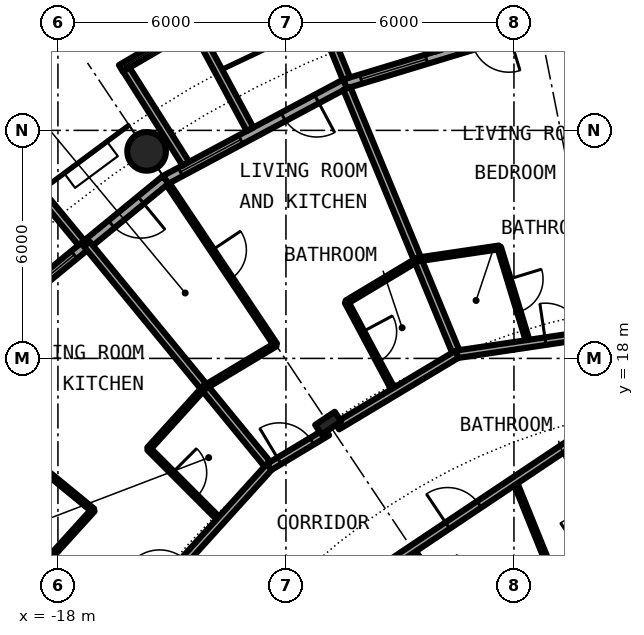
"""IFC4 building model, lengths in metres.
Left out: names, types, materials, properties, quantities, classifications, styles, units other than length and angle.
Written with IfcOpenShell. Run it as: python <this file> out.ifc"""

import sys

from ifc_helpers import new_model, si_unit, direction, frame, frame_2d, origin, origin_2d, place, context, subcontext, project, spatial, rectangle, circle, hollow_circle, i_section, extrude, element, fill, save


model = new_model("IFC4")
c1 = context("Model", 3, precision=1e-05, world=origin(), true_north=direction((0.0, 1.0)))
c2 = subcontext(c1, "Body", "Model", "MODEL_VIEW")
j1 = project(units=[si_unit("LENGTHUNIT", "METRE"), si_unit("PLANEANGLEUNIT", "RADIAN")], contexts=[c1])
p1 = place(None, origin())
s1 = spatial("IfcSite", under=j1, at=p1, CompositionType="ELEMENT")
p2 = place(p1, origin())
s2 = spatial("IfcBuilding", under=s1, at=p2, CompositionType="ELEMENT")
p3 = place(p2, frame((0.0, 0.0, 31.95)))
s3 = spatial("IfcBuildingStorey", under=s2, at=p3, CompositionType="ELEMENT", Elevation=31.95)
p4 = place(p3, frame((-15.667, 23.448, 0.0), z_axis=(0.0, 0.0, 1.0), x_axis=(1.0, 0.0, 0.0)))
e1 = element("IfcColumn", 1, at=p4, inside=s3, PredefinedType="COLUMN", context=c2, shape_type="SweptSolid", body=[
    extrude(hollow_circle(Radius=0.508, WallThickness=0.05, at=origin_2d()), origin(), (0.0, 0.0, 1.0), 3.05),
])
p5 = place(p3, frame((-10.889, 16.297, 0.0), z_axis=(0.0, 0.0, 1.0), x_axis=(-0.55557023302, 0.831469612303, 0.0)))
e2 = element("IfcColumn", 2, at=p5, inside=s3, PredefinedType="COLUMN", context=c2, shape_type="SweptSolid", body=[
    extrude(i_section(OverallWidth=0.305, OverallDepth=0.62, WebThickness=0.021, FlangeThickness=0.04, FilletRadius=0.027, at=origin_2d()), origin(), (0.0, 0.0, 1.0), 3.05),
])
p6 = place(p3, frame((-5.326, 26.775, 0.0), z_axis=(0.0, 0.0, 1.0), x_axis=(-0.956965678721, -0.290201119486, 0.0)))
e3 = element("IfcWall", 3, at=p6, inside=s3, PredefinedType="SOLIDWALL", context=c2, shape_type="SweptSolid", body=[
    extrude(rectangle(XDim=5.351, YDim=0.25, at=frame_2d((2.676, 0.0))), origin(), (0.0, 0.0, 1.0), 2.7),
])
p7 = place(p6, frame((0.841, 0.0, 0.0)))
e4 = element("IfcOpeningElement", 4, at=p7, cuts=e3, PredefinedType="OPENING", context=c2, shape_type="SweptSolid", body=[
    extrude(rectangle(XDim=1.0, YDim=2.2, at=frame_2d((0.5, 1.1))), frame((0.0, 0.135, 0.0), z_axis=(0.0, -1.0, 0.0), x_axis=(1.0, 0.0, 0.0)), (0.0, 0.0, 1.0), 0.27),
])
p8 = place(p6, frame((3.111, 0.0, 0.3)))
e5 = element("IfcOpeningElement", 5, at=p8, cuts=e3, PredefinedType="OPENING", context=c2, shape_type="SweptSolid", body=[
    extrude(rectangle(XDim=1.8, YDim=2.1, at=frame_2d((0.9, 1.05))), frame((0.0, 0.135, 0.0), z_axis=(0.0, -1.0, 0.0), x_axis=(1.0, 0.0, 0.0)), (0.0, 0.0, 1.0), 0.27),
])
p9 = place(p3, frame((-8.009, 26.092, -0.03), z_axis=(0.0, 0.0, 1.0), x_axis=(-0.293406695073, 0.955987715029, 0.0)))
e6 = element("IfcWall", 6, at=p9, inside=s3, PredefinedType="SOLIDWALL", context=c2, shape_type="SweptSolid", body=[
    extrude(rectangle(XDim=3.006, YDim=0.2, at=frame_2d((1.503, 0.0))), origin(), (0.0, 0.0, 1.0), 2.73),
])
p10 = place(p3, frame((-10.409, 25.364, -0.03), z_axis=(0.0, 0.0, 1.0), x_axis=(-0.379509886562, 0.925187681501, 0.0)))
e7 = element("IfcWall", 7, at=p10, inside=s3, PredefinedType="SOLIDWALL", context=c2, shape_type="SweptSolid", body=[
    extrude(rectangle(XDim=2.883, YDim=0.2, at=frame_2d((1.441, 0.0))), origin(), (0.0, 0.0, 1.0), 2.73),
])
p11 = place(p3, frame((-10.447, 25.222, 0.0), z_axis=(0.0, 0.0, 1.0), x_axis=(-0.881915646801, -0.471407246368, 0.0)))
e8 = element("IfcWall", 8, at=p11, inside=s3, PredefinedType="SOLIDWALL", context=c2, shape_type="SweptSolid", body=[
    extrude(rectangle(XDim=5.352, YDim=0.25, at=frame_2d((2.676, 0.0))), origin(), (0.0, 0.0, 1.0), 2.7),
])
p12 = place(p11, frame((0.841, 0.0, 0.0)))
e9 = element("IfcOpeningElement", 9, at=p12, cuts=e8, PredefinedType="OPENING", context=c2, shape_type="SweptSolid", body=[
    extrude(rectangle(XDim=1.0, YDim=2.2, at=frame_2d((0.5, 1.1))), frame((0.0, 0.135, 0.0), z_axis=(0.0, -1.0, 0.0), x_axis=(1.0, 0.0, 0.0)), (0.0, 0.0, 1.0), 0.27),
])
p13 = place(p11, frame((3.111, 0.0, 0.3)))
e10 = element("IfcOpeningElement", 10, at=p13, cuts=e8, PredefinedType="OPENING", context=c2, shape_type="SweptSolid", body=[
    extrude(rectangle(XDim=1.8, YDim=2.1, at=frame_2d((0.9, 1.05))), frame((0.0, 0.135, 0.0), z_axis=(0.0, -1.0, 0.0), x_axis=(1.0, 0.0, 0.0)), (0.0, 0.0, 1.0), 0.27),
])
p14 = place(p3, frame((-14.327, 26.812, -0.03), z_axis=(0.0, 0.0, 1.0), x_axis=(-0.863346521872, -0.504611517081, 0.0)))
e11 = element("IfcWall", 11, at=p14, inside=s3, PredefinedType="SOLIDWALL", context=c2, shape_type="SweptSolid", body=[
    extrude(rectangle(XDim=2.336, YDim=0.2, at=frame_2d((1.168, 0.0))), origin(), (0.0, 0.0, 1.0), 2.73),
])
p15 = place(p14, frame((0.128, 0.0, 0.33)))
e12 = element("IfcOpeningElement", 12, at=p15, cuts=e11, PredefinedType="OPENING", context=c2, shape_type="SweptSolid", body=[
    extrude(circle(Radius=1.04, at=frame_2d((1.04, 1.04))), frame((0.0, 0.11, 0.0), z_axis=(0.0, -1.0, 0.0), x_axis=(1.0, 0.0, 0.0)), (0.0, 0.0, 1.0), 0.22),
])
p16 = place(p3, frame((-12.945, 24.029, -0.03), z_axis=(0.0, 0.0, 1.0), x_axis=(-0.474424310775, 0.88029629861, 0.0)))
e13 = element("IfcWall", 13, at=p16, inside=s3, PredefinedType="SOLIDWALL", context=c2, shape_type="SweptSolid", body=[
    extrude(rectangle(XDim=3.006, YDim=0.2, at=frame_2d((1.503, 0.0))), origin(), (0.0, 0.0, 1.0), 2.73),
])
p17 = place(p3, frame((-14.635, 23.126, -0.03), z_axis=(0.0, 0.0, 1.0), x_axis=(-0.534437802731, 0.845207805816, 0.0)))
e14 = element("IfcWall", 14, at=p17, inside=s3, PredefinedType="SOLIDWALL", context=c2, shape_type="SweptSolid", body=[
    extrude(rectangle(XDim=2.932, YDim=0.2, at=frame_2d((1.466, 0.0))), origin(), (0.0, 0.0, 1.0), 2.73),
])
p18 = place(p3, frame((-15.167, 22.699, 0.0), z_axis=(0.0, 0.0, 1.0), x_axis=(-0.773019449054, -0.634382322723, 0.0)))
e15 = element("IfcWall", 15, at=p18, inside=s3, PredefinedType="SOLIDWALL", context=c2, shape_type="SweptSolid", body=[
    extrude(rectangle(XDim=5.352, YDim=0.25, at=frame_2d((2.676, 0.0))), origin(), (0.0, 0.0, 1.0), 2.7),
])
p19 = place(p18, frame((0.841, 0.0, 0.0)))
e16 = element("IfcOpeningElement", 16, at=p19, cuts=e15, PredefinedType="OPENING", context=c2, shape_type="SweptSolid", body=[
    extrude(rectangle(XDim=1.0, YDim=2.2, at=frame_2d((0.5, 1.1))), frame((0.0, 0.135, 0.0), z_axis=(0.0, -1.0, 0.0), x_axis=(1.0, 0.0, 0.0)), (0.0, 0.0, 1.0), 0.27),
])
p20 = place(p18, frame((3.111, 0.0, 0.3)))
e17 = element("IfcOpeningElement", 17, at=p20, cuts=e15, PredefinedType="OPENING", context=c2, shape_type="SweptSolid", body=[
    extrude(rectangle(XDim=1.8, YDim=2.1, at=frame_2d((0.9, 1.05))), frame((0.0, 0.135, 0.0), z_axis=(0.0, -1.0, 0.0), x_axis=(1.0, 0.0, 0.0)), (0.0, 0.0, 1.0), 0.27),
])
p21 = place(p3, frame((-17.384, 21.041, -0.03), z_axis=(0.0, 0.0, 1.0), x_axis=(-0.63709551667, 0.770784861449, 0.0)))
e18 = element("IfcWall", 18, at=p21, inside=s3, PredefinedType="SOLIDWALL", context=c2, shape_type="SweptSolid", body=[
    extrude(rectangle(XDim=3.006, YDim=0.2, at=frame_2d((1.503, 0.0))), origin(), (0.0, 0.0, 1.0), 2.73),
])
p22 = place(p3, frame((-22.595, 15.097, 0.0), z_axis=(0.0, 0.0, 1.0), x_axis=(0.831465568067, -0.555576285599, 0.0)))
e19 = element("IfcWall", 19, at=p22, inside=s3, PredefinedType="PARTITIONING", context=c2, shape_type="SweptSolid", body=[
    extrude(rectangle(XDim=7.264, YDim=0.2, at=frame_2d((3.632, 0.0))), origin(), (0.0, 0.0, 1.0), 2.7),
])
p23 = place(p3, frame((-21.012, 17.233, 0.0), z_axis=(0.0, 0.0, 1.0), x_axis=(0.77326214499, -0.634086472908, 0.0)))
e20 = element("IfcWall", 20, at=p23, inside=s3, PredefinedType="PARTITIONING", context=c2, shape_type="SweptSolid", body=[
    extrude(rectangle(XDim=5.089, YDim=0.1, at=frame_2d((2.544, 0.0))), origin(), (0.0, 0.0, 1.0), 2.7),
])
p24 = place(p23, frame((2.094, 0.0, 0.0)))
e21 = element("IfcOpeningElement", 21, at=p24, cuts=e20, PredefinedType="OPENING", context=c2, shape_type="SweptSolid", body=[
    extrude(rectangle(XDim=0.9, YDim=2.3, at=frame_2d((0.45, 1.15))), frame((0.0, 0.06, 0.0), z_axis=(0.0, -1.0, 0.0), x_axis=(1.0, 0.0, 0.0)), (0.0, 0.0, 1.0), 0.12),
])
p25 = place(p3, frame((-17.24, 21.007, 0.0), z_axis=(0.0, 0.0, 1.0), x_axis=(0.634381303318, -0.773020285633, 0.0)))
e22 = element("IfcWall", 22, at=p25, inside=s3, PredefinedType="PARTITIONING", context=c2, shape_type="SweptSolid", body=[
    extrude(rectangle(XDim=7.576, YDim=0.2, at=frame_2d((3.788, 0.0))), origin(), (0.0, 0.0, 1.0), 2.7),
])
p26 = place(p3, frame((-15.612, 15.622, 0.0), z_axis=(0.0, 0.0, 1.0), x_axis=(0.706741540154, -0.707471833659, 0.0)))
e23 = element("IfcWall", 23, at=p26, inside=s3, PredefinedType="PARTITIONING", context=c2, shape_type="SweptSolid", body=[
    extrude(rectangle(XDim=2.674, YDim=0.1, at=frame_2d((1.337, 0.0))), origin(), (0.0, 0.0, 1.0), 2.7),
])
p27 = place(p26, frame((0.887, 0.0, 0.0)))
e24 = element("IfcOpeningElement", 24, at=p27, cuts=e23, PredefinedType="OPENING", context=c2, shape_type="SweptSolid", body=[
    extrude(rectangle(XDim=0.9, YDim=2.3, at=frame_2d((0.45, 1.15))), frame((0.0, 0.06, 0.0), z_axis=(0.0, -1.0, 0.0), x_axis=(1.0, 0.0, 0.0)), (0.0, 0.0, 1.0), 0.12),
])
p28 = place(p3, frame((-15.105, 22.59, 0.0), z_axis=(0.0, 0.0, 1.0), x_axis=(0.555939561221, -0.831222716406, 0.0)))
e25 = element("IfcWall", 25, at=p28, inside=s3, PredefinedType="PARTITIONING", context=c2, shape_type="SweptSolid", body=[
    extrude(rectangle(XDim=5.089, YDim=0.1, at=frame_2d((2.544, 0.0))), origin(), (0.0, 0.0, 1.0), 2.7),
])
p29 = place(p28, frame((2.094, 0.0, 0.0)))
e26 = element("IfcOpeningElement", 26, at=p29, cuts=e25, PredefinedType="OPENING", context=c2, shape_type="SweptSolid", body=[
    extrude(rectangle(XDim=0.9, YDim=2.3, at=frame_2d((0.45, 1.15))), frame((0.0, 0.06, 0.0), z_axis=(0.0, -1.0, 0.0), x_axis=(1.0, 0.0, 0.0)), (0.0, 0.0, 1.0), 0.12),
])
p30 = place(p3, frame((-10.405, 19.481, 0.0), z_axis=(0.0, 0.0, 1.0), x_axis=(0.471151994359, -0.882052038267, 0.0)))
e27 = element("IfcWall", 27, at=p30, inside=s3, PredefinedType="PARTITIONING", context=c2, shape_type="SweptSolid", body=[
    extrude(rectangle(XDim=2.674, YDim=0.1, at=frame_2d((1.337, 0.0))), origin(), (0.0, 0.0, 1.0), 2.7),
])
p31 = place(p30, frame((0.887, 0.0, 0.0)))
e28 = element("IfcOpeningElement", 28, at=p31, cuts=e27, PredefinedType="OPENING", context=c2, shape_type="SweptSolid", body=[
    extrude(rectangle(XDim=0.9, YDim=2.3, at=frame_2d((0.45, 1.15))), frame((0.0, 0.06, 0.0), z_axis=(0.0, -1.0, 0.0), x_axis=(1.0, 0.0, 0.0)), (0.0, 0.0, 1.0), 0.12),
])
p32 = place(p3, frame((-10.398, 25.106, 0.0), z_axis=(0.0, 0.0, 1.0), x_axis=(0.382490346157, -0.923959487801, 0.0)))
e29 = element("IfcWall", 29, at=p32, inside=s3, PredefinedType="PARTITIONING", context=c2, shape_type="SweptSolid", body=[
    extrude(rectangle(XDim=7.574, YDim=0.2, at=frame_2d((3.787, 0.0))), origin(), (0.0, 0.0, 1.0), 2.7),
])
p33 = place(p3, frame((-8.674, 12.982, 0.0), z_axis=(0.0, 0.0, 1.0), x_axis=(0.555355163998, -0.831613276602, 0.0)))
e30 = element("IfcWall", 30, at=p33, inside=s3, PredefinedType="PARTITIONING", context=c2, shape_type="SweptSolid", body=[
    extrude(rectangle(XDim=2.494, YDim=0.1, at=frame_2d((1.247, 0.0))), origin(), (0.0, 0.0, 1.0), 2.7),
])
p34 = place(p33, frame((0.797, 0.0, 0.0)))
e31 = element("IfcOpeningElement", 31, at=p34, cuts=e30, PredefinedType="OPENING", context=c2, shape_type="SweptSolid", body=[
    extrude(rectangle(XDim=0.9, YDim=2.3, at=frame_2d((0.45, 1.15))), frame((0.0, 0.06, 0.0), z_axis=(0.0, -1.0, 0.0), x_axis=(1.0, 0.0, 0.0)), (0.0, 0.0, 1.0), 0.12),
])
p35 = place(p3, frame((-6.39, 20.921, 0.0), z_axis=(0.0, 0.0, 1.0), x_axis=(0.292206826201, -0.956355148845, 0.0)))
e32 = element("IfcWall", 32, at=p35, inside=s3, PredefinedType="PARTITIONING", context=c2, shape_type="SweptSolid", body=[
    extrude(rectangle(XDim=2.648, YDim=0.1, at=frame_2d((1.324, 0.0))), origin(), (0.0, 0.0, 1.0), 2.7),
])
p36 = place(p35, frame((0.874, 0.0, 0.0)))
e33 = element("IfcOpeningElement", 33, at=p36, cuts=e32, PredefinedType="OPENING", context=c2, shape_type="SweptSolid", body=[
    extrude(rectangle(XDim=0.9, YDim=2.3, at=frame_2d((0.45, 1.15))), frame((0.0, 0.06, 0.0), z_axis=(0.0, -1.0, 0.0), x_axis=(1.0, 0.0, 0.0)), (0.0, 0.0, 1.0), 0.12),
])
p37 = place(p3, frame((-5.986, 14.779, 0.0), z_axis=(0.0, 0.0, 1.0), x_axis=(0.375649498413, -0.926761811008, 0.0)))
e34 = element("IfcWall", 34, at=p37, inside=s3, PredefinedType="PARTITIONING", context=c2, shape_type="SweptSolid", body=[
    extrude(rectangle(XDim=2.548, YDim=0.1, at=frame_2d((1.274, 0.0))), origin(), (0.0, 0.0, 1.0), 2.7),
])
p38 = place(p3, frame((-5.03, 12.417, 0.0), z_axis=(0.0, 0.0, 1.0), x_axis=(0.831538390496, 0.555467285384, 0.0)))
e35 = element("IfcWall", 35, at=p38, inside=s3, PredefinedType="PARTITIONING", context=c2, shape_type="SweptSolid", body=[
    extrude(rectangle(XDim=2.717, YDim=0.1, at=frame_2d((1.358, 0.0))), origin(), (0.0, 0.0, 1.0), 2.7),
])
p39 = place(p38, frame((0.91, 0.0, 0.0)))
e36 = element("IfcOpeningElement", 36, at=p39, cuts=e35, PredefinedType="OPENING", context=c2, shape_type="SweptSolid", body=[
    extrude(rectangle(XDim=0.9, YDim=2.3, at=frame_2d((0.45, 1.15))), frame((0.0, 0.06, 0.0), z_axis=(0.0, -1.0, 0.0), x_axis=(1.0, 0.0, 0.0)), (0.0, 0.0, 1.0), 0.12),
])
p40 = place(p3, frame((-14.039, 9.396, 0.0), z_axis=(0.0, 0.0, 1.0), x_axis=(0.831348689697, 0.555751163866, 0.0)))
e37 = element("IfcWall", 37, at=p40, inside=s3, PredefinedType="PARTITIONING", context=c2, shape_type="SweptSolid", body=[
    extrude(rectangle(XDim=12.914, YDim=0.2, at=frame_2d((6.457, 0.0))), origin(), (0.0, 0.0, 1.0), 2.7),
])
p41 = place(p40, frame((7.568, 0.0, 0.0)))
e38 = element("IfcOpeningElement", 38, at=p41, cuts=e37, PredefinedType="OPENING", context=c2, shape_type="SweptSolid", body=[
    extrude(rectangle(XDim=1.0, YDim=2.3, at=frame_2d((0.5, 1.15))), frame((0.0, 0.11, 0.0), z_axis=(0.0, -1.0, 0.0), x_axis=(1.0, 0.0, 0.0)), (0.0, 0.0, 1.0), 0.22),
])
p42 = place(p3, frame((-7.501, 18.108, 0.0), z_axis=(0.0, 0.0, 1.0), x_axis=(0.989167514259, 0.146791105777, 0.0)))
e39 = element("IfcWall", 39, at=p42, inside=s3, PredefinedType="PARTITIONING", context=c2, shape_type="SweptSolid", body=[
    extrude(rectangle(XDim=9.525, YDim=0.2, at=frame_2d((4.763, 0.0))), origin(), (0.0, 0.0, 1.0), 2.38),
])
p43 = place(p42, frame((2.355, 0.0, 0.0)))
e40 = element("IfcOpeningElement", 40, at=p43, cuts=e39, PredefinedType="OPENING", context=c2, shape_type="SweptSolid", body=[
    extrude(rectangle(XDim=1.0, YDim=2.3, at=frame_2d((0.5, 1.15))), frame((0.0, 0.11, 0.0), z_axis=(0.0, -1.0, 0.0), x_axis=(1.0, 0.0, 0.0)), (0.0, 0.0, 1.0), 0.22),
])
p44 = place(p3, frame((-16.193, 11.003, 0.0), z_axis=(0.0, 0.0, 1.0), x_axis=(0.671514934772, 0.740991020444, 0.0)))
e41 = element("IfcWall", 41, at=p44, inside=s3, PredefinedType="PARTITIONING", context=c2, shape_type="SweptSolid", body=[
    extrude(rectangle(XDim=5.598, YDim=0.2, at=frame_2d((2.799, 0.0))), origin(), (0.0, 0.0, 1.0), 2.38),
])
p45 = place(p44, frame((1.293, 0.0, 0.0)))
e42 = element("IfcOpeningElement", 42, at=p45, cuts=e41, PredefinedType="OPENING", context=c2, shape_type="SweptSolid", body=[
    extrude(rectangle(XDim=1.0, YDim=2.3, at=frame_2d((0.5, 1.15))), frame((0.0, 0.11, 0.0), z_axis=(0.0, -1.0, 0.0), x_axis=(1.0, 0.0, 0.0)), (0.0, 0.0, 1.0), 0.22),
])
p46 = place(p3, frame((-12.439, 15.146, 0.0), z_axis=(0.0, 0.0, 1.0), x_axis=(0.857323214505, 0.514778501757, 0.0)))
e43 = element("IfcWall", 43, at=p46, inside=s3, PredefinedType="PARTITIONING", context=c2, shape_type="SweptSolid", body=[
    extrude(rectangle(XDim=1.778, YDim=0.2, at=frame_2d((0.889, 0.0))), origin(), (0.0, 0.0, 1.0), 2.38),
])
p47 = place(p46, frame((0.307, 0.0, 0.0)))
e44 = element("IfcOpeningElement", 44, at=p47, cuts=e43, PredefinedType="OPENING", context=c2, shape_type="SweptSolid", body=[
    extrude(rectangle(XDim=1.0, YDim=2.3, at=frame_2d((0.5, 1.15))), frame((0.0, 0.11, 0.0), z_axis=(0.0, -1.0, 0.0), x_axis=(1.0, 0.0, 0.0)), (0.0, 0.0, 1.0), 0.22),
])
p48 = place(p3, frame((-10.653, 16.218, 0.0), z_axis=(0.0, 0.0, 1.0), x_axis=(0.857656999296, 0.514222200569, 0.0)))
e45 = element("IfcWall", 45, at=p48, inside=s3, PredefinedType="PARTITIONING", context=c2, shape_type="SweptSolid", body=[
    extrude(rectangle(XDim=3.675, YDim=0.2, at=frame_2d((1.838, 0.0))), origin(), (0.0, 0.0, 1.0), 2.38),
])
p49 = place(p3, frame((-8.534, 20.603, 0.0), z_axis=(0.0, 0.0, 1.0), x_axis=(0.989187732684, 0.14665479708, 0.0)))
e46 = element("IfcWall", 46, at=p49, inside=s3, PredefinedType="PARTITIONING", context=c2, shape_type="SweptSolid", body=[
    extrude(rectangle(XDim=2.167, YDim=0.1, at=frame_2d((1.084, 0.0))), origin(), (0.0, 0.0, 1.0), 2.7),
])
for number, where, z_axis, x_axis in (
    (47, (-18.538, 12.394, 0.0), (0.0, 0.0, 1.0), (0.672, 0.741, 0.0)),
    (48, (-15.613, 15.621, 0.0), (0.0, 0.0, 1.0), (0.672, 0.741, 0.0)),
):
    element("IfcWall", number, at=place(p3, frame(where, z_axis=z_axis, x_axis=x_axis)), inside=s3, PredefinedType="PARTITIONING", context=c2, shape_type="SweptSolid", body=[
        extrude(rectangle(XDim=2.183, YDim=0.1, at=frame_2d((1.091, 0.0))), origin(), (0.0, 0.0, 1.0), 2.7),
    ])
for number, where, z_axis, x_axis in (
    (49, (-14.147, 17.237, 0.0), (0.0, 0.0, 1.0), (0.858, 0.514, 0.0)),
    (50, (-10.405, 19.481, 0.0), (0.0, 0.0, 1.0), (0.858, 0.514, 0.0)),
):
    element("IfcWall", number, at=place(p3, frame(where, z_axis=z_axis, x_axis=x_axis)), inside=s3, PredefinedType="PARTITIONING", context=c2, shape_type="SweptSolid", body=[
        extrude(rectangle(XDim=2.182, YDim=0.1, at=frame_2d((1.091, 0.0))), origin(), (0.0, 0.0, 1.0), 2.7),
    ])
p50 = place(p8, origin())
e51 = element("IfcWindow", 51, at=p50, inside=s3, PartitioningType="SINGLE_PANEL", PredefinedType="WINDOW", context=c2, shape_type="SweptSolid", body=[
    extrude(rectangle(XDim=1.8, YDim=2.1, at=frame_2d((0.9, 1.05))), frame((0.0, 0.03, 0.0), z_axis=(0.0, -1.0, 0.0), x_axis=(1.0, 0.0, 0.0)), (0.0, 0.0, 1.0), 0.06),
])
fill(e5, e51)
p51 = place(p12, origin())
e52 = element("IfcDoor", 52, at=p51, inside=s3, OperationType="SINGLE_SWING_LEFT", PredefinedType="DOOR", context=c2, shape_type="SweptSolid", body=[
    extrude(rectangle(XDim=1.0, YDim=2.2, at=frame_2d((0.5, 1.1))), frame((0.0, 0.025, 0.0), z_axis=(0.0, -1.0, 0.0), x_axis=(1.0, 0.0, 0.0)), (0.0, 0.0, 1.0), 0.05),
])
fill(e9, e52)
p52 = place(p13, origin())
e53 = element("IfcWindow", 53, at=p52, inside=s3, PartitioningType="SINGLE_PANEL", PredefinedType="WINDOW", context=c2, shape_type="SweptSolid", body=[
    extrude(rectangle(XDim=1.8, YDim=2.1, at=frame_2d((0.9, 1.05))), frame((0.0, 0.03, 0.0), z_axis=(0.0, -1.0, 0.0), x_axis=(1.0, 0.0, 0.0)), (0.0, 0.0, 1.0), 0.06),
])
fill(e10, e53)
p53 = place(p15, origin())
e54 = element("IfcWindow", 54, at=p53, inside=s3, PartitioningType="SINGLE_PANEL", PredefinedType="WINDOW", context=c2, shape_type="SweptSolid", body=[
    extrude(circle(Radius=1.04, at=frame_2d((1.04, 1.04))), frame((0.0, 0.03, 0.0), z_axis=(0.0, -1.0, 0.0), x_axis=(1.0, 0.0, 0.0)), (0.0, 0.0, 1.0), 0.06),
])
fill(e12, e54)
p54 = place(p19, origin())
e55 = element("IfcDoor", 55, at=p54, inside=s3, OperationType="SINGLE_SWING_LEFT", PredefinedType="DOOR", context=c2, shape_type="SweptSolid", body=[
    extrude(rectangle(XDim=1.0, YDim=2.2, at=frame_2d((0.5, 1.1))), frame((0.0, 0.025, 0.0), z_axis=(0.0, -1.0, 0.0), x_axis=(1.0, 0.0, 0.0)), (0.0, 0.0, 1.0), 0.05),
])
fill(e16, e55)
p55 = place(p20, origin())
e56 = element("IfcWindow", 56, at=p55, inside=s3, PartitioningType="SINGLE_PANEL", PredefinedType="WINDOW", context=c2, shape_type="SweptSolid", body=[
    extrude(rectangle(XDim=1.8, YDim=2.1, at=frame_2d((0.9, 1.05))), frame((0.0, 0.03, 0.0), z_axis=(0.0, -1.0, 0.0), x_axis=(1.0, 0.0, 0.0)), (0.0, 0.0, 1.0), 0.06),
])
fill(e17, e56)
p56 = place(p43, origin())
e57 = element("IfcDoor", 57, at=p56, inside=s3, OperationType="SINGLE_SWING_LEFT", PredefinedType="DOOR", context=c2, shape_type="SweptSolid", body=[
    extrude(rectangle(XDim=1.0, YDim=2.3, at=frame_2d((0.5, 1.15))), frame((0.0, 0.025, 0.0), z_axis=(0.0, -1.0, 0.0), x_axis=(1.0, 0.0, 0.0)), (0.0, 0.0, 1.0), 0.05),
])
fill(e40, e57)
p57 = place(p36, origin())
e58 = element("IfcDoor", 58, at=p57, inside=s3, OperationType="SINGLE_SWING_LEFT", PredefinedType="DOOR", context=c2, shape_type="SweptSolid", body=[
    extrude(rectangle(XDim=0.9, YDim=2.3, at=frame_2d((0.45, 1.15))), frame((0.0, 0.025, 0.0), z_axis=(0.0, -1.0, 0.0), x_axis=(1.0, 0.0, 0.0)), (0.0, 0.0, 1.0), 0.05),
])
fill(e33, e58)
p58 = place(p47, origin())
e59 = element("IfcDoor", 59, at=p58, inside=s3, OperationType="SINGLE_SWING_LEFT", PredefinedType="DOOR", context=c2, shape_type="SweptSolid", body=[
    extrude(rectangle(XDim=1.0, YDim=2.3, at=frame_2d((0.5, 1.15))), frame((0.0, 0.025, 0.0), z_axis=(0.0, -1.0, 0.0), x_axis=(1.0, 0.0, 0.0)), (0.0, 0.0, 1.0), 0.05),
])
fill(e44, e59)
p59 = place(p31, origin())
e60 = element("IfcDoor", 60, at=p59, inside=s3, OperationType="SINGLE_SWING_LEFT", PredefinedType="DOOR", context=c2, shape_type="SweptSolid", body=[
    extrude(rectangle(XDim=0.9, YDim=2.3, at=frame_2d((0.45, 1.15))), frame((0.0, 0.025, 0.0), z_axis=(0.0, -1.0, 0.0), x_axis=(1.0, 0.0, 0.0)), (0.0, 0.0, 1.0), 0.05),
])
fill(e28, e60)
p60 = place(p29, origin())
e61 = element("IfcDoor", 61, at=p60, inside=s3, OperationType="SINGLE_SWING_RIGHT", PredefinedType="DOOR", context=c2, shape_type="SweptSolid", body=[
    extrude(rectangle(XDim=0.9, YDim=2.3, at=frame_2d((0.45, 1.15))), frame((0.0, 0.025, 0.0), z_axis=(0.0, -1.0, 0.0), x_axis=(1.0, 0.0, 0.0)), (0.0, 0.0, 1.0), 0.05),
])
fill(e26, e61)
p61 = place(p27, origin())
e62 = element("IfcDoor", 62, at=p61, inside=s3, OperationType="SINGLE_SWING_RIGHT", PredefinedType="DOOR", context=c2, shape_type="SweptSolid", body=[
    extrude(rectangle(XDim=0.9, YDim=2.3, at=frame_2d((0.45, 1.15))), frame((0.0, 0.025, 0.0), z_axis=(0.0, -1.0, 0.0), x_axis=(1.0, 0.0, 0.0)), (0.0, 0.0, 1.0), 0.05),
])
fill(e24, e62)
p62 = place(p41, origin())
e63 = element("IfcDoor", 63, at=p62, inside=s3, OperationType="SINGLE_SWING_RIGHT", PredefinedType="DOOR", context=c2, shape_type="SweptSolid", body=[
    extrude(rectangle(XDim=1.0, YDim=2.3, at=frame_2d((0.5, 1.15))), frame((0.0, 0.025, 0.0), z_axis=(0.0, -1.0, 0.0), x_axis=(1.0, 0.0, 0.0)), (0.0, 0.0, 1.0), 0.05),
])
fill(e38, e63)
save(model, sys.argv[1])
